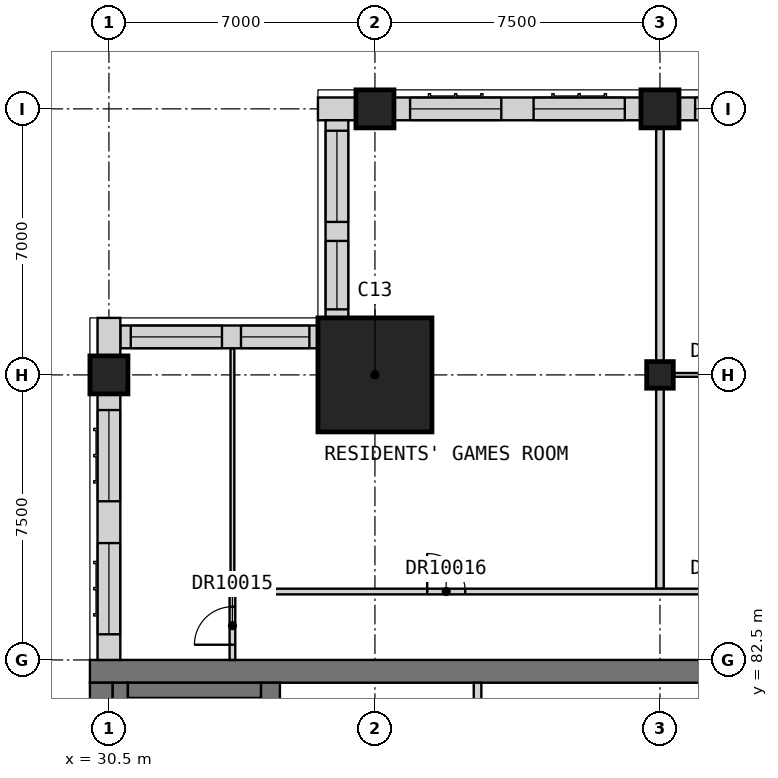
"""IFC4 building model, lengths in metres.
Left out: names, types, materials, properties, quantities, classifications, styles, units other than length and angle.
Written with IfcOpenShell. Run it as: python <this file> out.ifc"""

import sys

from ifc_helpers import new_model, si_unit, direction, frame, frame_2d, origin, origin_2d, place, context, subcontext, project, spatial, rectangle, extrude, element, fill, save


model = new_model("IFC4")
c1 = context("Model", 3, precision=1e-05, world=origin(), true_north=direction((0.0, 1.0)))
c2 = subcontext(c1, "Body", "Model", "MODEL_VIEW")
j1 = project(units=[si_unit("LENGTHUNIT", "METRE"), si_unit("PLANEANGLEUNIT", "RADIAN")], contexts=[c1])
p1 = place(None, origin())
s1 = spatial("IfcSite", under=j1, at=p1, CompositionType="ELEMENT")
p2 = place(p1, origin())
s2 = spatial("IfcBuilding", under=s1, at=p2, CompositionType="ELEMENT")
p3 = place(p2, frame((0.0, 0.0, 283.7)))
s3 = spatial("IfcBuildingStorey", under=s2, at=p3, CompositionType="ELEMENT", Elevation=283.7)
for number, where, z_axis, x_axis in (
    (1, (30.5, 90.0, 0.0), (0.0, 0.0, 1.0), (1.0, 0.0, 0.0)),
    (2, (37.5, 97.0, 0.0), (0.0, 0.0, 1.0), (1.0, 0.0, 0.0)),
):
    element("IfcColumn", number, at=place(p3, frame(where, z_axis=z_axis, x_axis=x_axis)), inside=s3, PredefinedType="COLUMN", context=c2, shape_type="SweptSolid", body=[
        extrude(rectangle(XDim=1.0, YDim=1.0, at=origin_2d()), origin(), (0.0, 0.0, 1.0), 3.5),
    ])
p4 = place(p3, frame((45.0, 90.0, 0.0), z_axis=(0.0, 0.0, 1.0), x_axis=(1.0, 0.0, 0.0)))
e3 = element("IfcColumn", 3, at=p4, inside=s3, PredefinedType="COLUMN", context=c2, shape_type="SweptSolid", body=[
    extrude(rectangle(XDim=0.7, YDim=0.7, at=origin_2d()), origin(), (0.0, 0.0, 1.0), 3.5),
])
p5 = place(p3, frame((45.0, 97.0, 0.0), z_axis=(0.0, 0.0, 1.0), x_axis=(1.0, 0.0, 0.0)))
e4 = element("IfcColumn", 4, at=p5, inside=s3, PredefinedType="COLUMN", context=c2, shape_type="SweptSolid", body=[
    extrude(rectangle(XDim=1.0, YDim=1.0, at=origin_2d()), origin(), (0.0, 0.0, 1.0), 3.5),
])
p6 = place(p3, frame((37.5, 90.0, 0.0), z_axis=(0.0, 0.0, 1.0), x_axis=(1.0, 0.0, 0.0)))
e5 = element("IfcColumn", 5, at=p6, inside=s3, PredefinedType="COLUMN", context=c2, shape_type="SweptSolid", body=[
    extrude(rectangle(XDim=3.0, YDim=3.0, at=origin_2d()), origin(), (0.0, 0.0, 1.0), 3.5),
])
p7 = place(p3, frame((30.0, 82.2, 0.0), z_axis=(0.0, 0.0, 1.0), x_axis=(1.0, 0.0, 0.0)))
e6 = element("IfcWall", 6, at=p7, inside=s3, PredefinedType="SHEAR", context=c2, shape_type="SweptSolid", body=[
    extrude(rectangle(XDim=30.0, YDim=0.6, at=frame_2d((15.0, 0.0))), origin(), (0.0, 0.0, 1.0), 3.5),
])
p8 = place(p3, frame((30.3, 60.6, 0.0), z_axis=(0.0, 0.0, 1.0), x_axis=(0.0, 1.0, 0.0)))
e7 = element("IfcWall", 7, at=p8, inside=s3, PredefinedType="SHEAR", context=c2, shape_type="SweptSolid", body=[
    extrude(rectangle(XDim=21.3, YDim=0.6, at=frame_2d((10.65, 0.0))), origin(), (0.0, 0.0, 1.0), 3.5),
])
p9 = place(p3, frame((34.75, 78.3, 0.0), z_axis=(0.0, 0.0, 1.0), x_axis=(0.0, 1.0, 0.0)))
e8 = element("IfcWall", 8, at=p9, inside=s3, PredefinedType="SHEAR", context=c2, shape_type="SweptSolid", body=[
    extrude(rectangle(XDim=3.6, YDim=0.5, at=frame_2d((1.8, 0.0))), origin(), (0.0, 0.0, 1.0), 3.5),
])
p10 = place(p3, frame((52.0, 97.0, 0.0), z_axis=(0.0, 0.0, 1.0), x_axis=(-1.0, 0.0, 0.0)))
e9 = element("IfcWall", 9, at=p10, inside=s3, PredefinedType="SOLIDWALL", context=c2, shape_type="SweptSolid", body=[
    extrude(rectangle(XDim=6.5, YDim=0.6, at=frame_2d((3.25, 0.0))), origin(), (0.0, 0.0, 1.0), 2.75),
])
p11 = place(p10, frame((3.675, 0.0, 0.8)))
e10 = element("IfcOpeningElement", 10, at=p11, cuts=e9, PredefinedType="OPENING", context=c2, shape_type="SweptSolid", body=[
    extrude(rectangle(XDim=2.4, YDim=1.8, at=frame_2d((1.2, 0.9))), frame((0.0, 0.31, 0.0), z_axis=(0.0, -1.0, 0.0), x_axis=(1.0, 0.0, 0.0)), (0.0, 0.0, 1.0), 0.62),
])
p12 = place(p10, frame((0.425, 0.0, 0.8)))
e11 = element("IfcOpeningElement", 11, at=p12, cuts=e9, PredefinedType="OPENING", context=c2, shape_type="SweptSolid", body=[
    extrude(rectangle(XDim=2.4, YDim=1.8, at=frame_2d((1.2, 0.9))), frame((0.0, 0.31, 0.0), z_axis=(0.0, -1.0, 0.0), x_axis=(1.0, 0.0, 0.0)), (0.0, 0.0, 1.0), 0.62),
])
p13 = place(p3, frame((44.5, 97.0, 0.0), z_axis=(0.0, 0.0, 1.0), x_axis=(-1.0, 0.0, 0.0)))
e12 = element("IfcWall", 12, at=p13, inside=s3, PredefinedType="SOLIDWALL", context=c2, shape_type="SweptSolid", body=[
    extrude(rectangle(XDim=6.5, YDim=0.6, at=frame_2d((3.25, 0.0))), origin(), (0.0, 0.0, 1.0), 2.75),
])
p14 = place(p13, frame((3.675, 0.0, 0.8)))
e13 = element("IfcOpeningElement", 13, at=p14, cuts=e12, PredefinedType="OPENING", context=c2, shape_type="SweptSolid", body=[
    extrude(rectangle(XDim=2.4, YDim=1.8, at=frame_2d((1.2, 0.9))), frame((0.0, 0.31, 0.0), z_axis=(0.0, -1.0, 0.0), x_axis=(1.0, 0.0, 0.0)), (0.0, 0.0, 1.0), 0.62),
])
p15 = place(p13, frame((0.425, 0.0, 0.8)))
e14 = element("IfcOpeningElement", 14, at=p15, cuts=e12, PredefinedType="OPENING", context=c2, shape_type="SweptSolid", body=[
    extrude(rectangle(XDim=2.4, YDim=1.8, at=frame_2d((1.2, 0.9))), frame((0.0, 0.31, 0.0), z_axis=(0.0, -1.0, 0.0), x_axis=(1.0, 0.0, 0.0)), (0.0, 0.0, 1.0), 0.62),
])
p16 = place(p3, frame((37.0, 97.0, 0.0), z_axis=(0.0, 0.0, 1.0), x_axis=(-1.0, 0.0, 0.0)))
e15 = element("IfcWall", 15, at=p16, inside=s3, PredefinedType="SOLIDWALL", context=c2, shape_type="SweptSolid", body=[
    extrude(rectangle(XDim=1.0, YDim=0.6, at=frame_2d((0.5, 0.0))), origin(), (0.0, 0.0, 1.0), 3.2),
])
p17 = place(p3, frame((36.5, 96.7, 0.0), z_axis=(0.0, 0.0, 1.0), x_axis=(0.0, -1.0, 0.0)))
e16 = element("IfcWall", 16, at=p17, inside=s3, PredefinedType="SOLIDWALL", context=c2, shape_type="SweptSolid", body=[
    extrude(rectangle(XDim=5.2, YDim=0.6, at=frame_2d((2.6, 0.0))), origin(), (0.0, 0.0, 1.0), 3.2),
])
p18 = place(p17, frame((3.175, 0.0, 0.8)))
e17 = element("IfcOpeningElement", 17, at=p18, cuts=e16, PredefinedType="OPENING", context=c2, shape_type="SweptSolid", body=[
    extrude(rectangle(XDim=1.8, YDim=1.8, at=frame_2d((0.9, 0.9))), frame((0.0, 0.31, 0.0), z_axis=(0.0, -1.0, 0.0), x_axis=(1.0, 0.0, 0.0)), (0.0, 0.0, 1.0), 0.62),
])
p19 = place(p17, frame((0.275, 0.0, 0.8)))
e18 = element("IfcOpeningElement", 18, at=p19, cuts=e16, PredefinedType="OPENING", context=c2, shape_type="SweptSolid", body=[
    extrude(rectangle(XDim=2.4, YDim=1.8, at=frame_2d((1.2, 0.9))), frame((0.0, 0.31, 0.0), z_axis=(0.0, -1.0, 0.0), x_axis=(1.0, 0.0, 0.0)), (0.0, 0.0, 1.0), 0.62),
])
p20 = place(p3, frame((36.0, 91.0, 0.0), z_axis=(0.0, 0.0, 1.0), x_axis=(-1.0, 0.0, 0.0)))
e19 = element("IfcWall", 19, at=p20, inside=s3, PredefinedType="SOLIDWALL", context=c2, shape_type="SweptSolid", body=[
    extrude(rectangle(XDim=5.2, YDim=0.6, at=frame_2d((2.6, 0.0))), origin(), (0.0, 0.0, 1.0), 3.2),
])
p21 = place(p20, frame((2.525, 0.0, 0.8)))
e20 = element("IfcOpeningElement", 20, at=p21, cuts=e19, PredefinedType="OPENING", context=c2, shape_type="SweptSolid", body=[
    extrude(rectangle(XDim=2.4, YDim=1.8, at=frame_2d((1.2, 0.9))), frame((0.0, 0.31, 0.0), z_axis=(0.0, -1.0, 0.0), x_axis=(1.0, 0.0, 0.0)), (0.0, 0.0, 1.0), 0.62),
])
p22 = place(p20, frame((0.225, 0.0, 0.8)))
e21 = element("IfcOpeningElement", 21, at=p22, cuts=e19, PredefinedType="OPENING", context=c2, shape_type="SweptSolid", body=[
    extrude(rectangle(XDim=1.8, YDim=1.8, at=frame_2d((0.9, 0.9))), frame((0.0, 0.31, 0.0), z_axis=(0.0, -1.0, 0.0), x_axis=(1.0, 0.0, 0.0)), (0.0, 0.0, 1.0), 0.62),
])
p23 = place(p3, frame((30.5, 91.5, 0.0), z_axis=(0.0, 0.0, 1.0), x_axis=(0.0, -1.0, 0.0)))
e22 = element("IfcWall", 22, at=p23, inside=s3, PredefinedType="SOLIDWALL", context=c2, shape_type="SweptSolid", body=[
    extrude(rectangle(XDim=1.0, YDim=0.6, at=frame_2d((0.5, 0.0))), origin(), (0.0, 0.0, 1.0), 3.2),
])
p24 = place(p3, frame((30.5, 89.5, 0.0), z_axis=(0.0, 0.0, 1.0), x_axis=(0.0, -1.0, 0.0)))
e23 = element("IfcWall", 23, at=p24, inside=s3, PredefinedType="SOLIDWALL", context=c2, shape_type="SweptSolid", body=[
    extrude(rectangle(XDim=7.0, YDim=0.6, at=frame_2d((3.5, 0.0))), origin(), (0.0, 0.0, 1.0), 3.2),
])
p25 = place(p24, frame((3.925, 0.0, 0.8)))
e24 = element("IfcOpeningElement", 24, at=p25, cuts=e23, PredefinedType="OPENING", context=c2, shape_type="SweptSolid", body=[
    extrude(rectangle(XDim=2.4, YDim=1.8, at=frame_2d((1.2, 0.9))), frame((0.0, 0.31, 0.0), z_axis=(0.0, -1.0, 0.0), x_axis=(1.0, 0.0, 0.0)), (0.0, 0.0, 1.0), 0.62),
])
p26 = place(p24, frame((0.425, 0.0, 0.8)))
e25 = element("IfcOpeningElement", 25, at=p26, cuts=e23, PredefinedType="OPENING", context=c2, shape_type="SweptSolid", body=[
    extrude(rectangle(XDim=2.4, YDim=1.8, at=frame_2d((1.2, 0.9))), frame((0.0, 0.31, 0.0), z_axis=(0.0, -1.0, 0.0), x_axis=(1.0, 0.0, 0.0)), (0.0, 0.0, 1.0), 0.62),
])
p27 = place(p3, frame((40.2, 78.5, 0.0), z_axis=(0.0, 0.0, 1.0), x_axis=(0.0, 1.0, 0.0)))
e26 = element("IfcWall", 26, at=p27, inside=s3, PredefinedType="SOLIDWALL", context=c2, shape_type="SweptSolid", body=[
    extrude(rectangle(XDim=3.4, YDim=0.2, at=frame_2d((1.7, 0.0))), origin(), (0.0, 0.0, 1.0), 3.5),
])
p28 = place(p3, frame((30.8, 60.6, 0.0), z_axis=(0.0, 0.0, 1.0), x_axis=(0.0, 1.0, 0.0)))
e27 = element("IfcWall", 27, at=p28, inside=s3, PredefinedType="SOLIDWALL", context=c2, shape_type="SweptSolid", body=[
    extrude(rectangle(XDim=21.3, YDim=0.4, at=frame_2d((10.65, 0.0))), origin(), (0.0, 0.0, 1.0), 3.2),
])
p29 = place(p3, frame((31.0, 81.7, 0.0), z_axis=(0.0, 0.0, 1.0), x_axis=(1.0, 0.0, 0.0)))
e28 = element("IfcWall", 28, at=p29, inside=s3, PredefinedType="SOLIDWALL", context=c2, shape_type="SweptSolid", body=[
    extrude(rectangle(XDim=3.5, YDim=0.4, at=frame_2d((1.75, 0.0))), origin(), (0.0, 0.0, 1.0), 3.2),
])
p30 = place(p3, frame((45.0, 84.375, 0.0), z_axis=(0.0, 0.0, 1.0), x_axis=(0.0, 1.0, 0.0)))
e29 = element("IfcWall", 29, at=p30, inside=s3, PredefinedType="PARTITIONING", context=c2, shape_type="SweptSolid", body=[
    extrude(rectangle(XDim=13.125, YDim=0.2, at=frame_2d((6.562, 0.0))), origin(), (0.0, 0.0, 1.0), 3.2),
])
p31 = place(p3, frame((33.75, 84.3, 0.0), z_axis=(0.0, 0.0, 1.0), x_axis=(1.0, 0.0, 0.0)))
e30 = element("IfcWall", 30, at=p31, inside=s3, PredefinedType="PARTITIONING", context=c2, shape_type="SweptSolid", body=[
    extrude(rectangle(XDim=28.05, YDim=0.15, at=frame_2d((14.025, 0.0))), origin(), (0.0, 0.0, 1.0), 3.2),
])
p32 = place(p31, frame((5.125, 0.0, 0.0)))
e31 = element("IfcOpeningElement", 31, at=p32, cuts=e30, PredefinedType="OPENING", context=c2, shape_type="SweptSolid", body=[
    extrude(rectangle(XDim=1.0, YDim=2.1, at=frame_2d((0.5, 1.05))), frame((0.0, 0.085, 0.0), z_axis=(0.0, -1.0, 0.0), x_axis=(1.0, 0.0, 0.0)), (0.0, 0.0, 1.0), 0.17),
])
p33 = place(p31, frame((12.675, 0.0, 0.0)))
e32 = element("IfcOpeningElement", 32, at=p33, cuts=e30, PredefinedType="OPENING", context=c2, shape_type="SweptSolid", body=[
    extrude(rectangle(XDim=0.9, YDim=2.1, at=frame_2d((0.45, 1.05))), frame((0.0, 0.085, 0.0), z_axis=(0.0, -1.0, 0.0), x_axis=(1.0, 0.0, 0.0)), (0.0, 0.0, 1.0), 0.17),
])
p34 = place(p31, frame((20.175, 0.0, 0.0)))
e33 = element("IfcOpeningElement", 33, at=p34, cuts=e30, PredefinedType="OPENING", context=c2, shape_type="SweptSolid", body=[
    extrude(rectangle(XDim=0.9, YDim=2.1, at=frame_2d((0.45, 1.05))), frame((0.0, 0.085, 0.0), z_axis=(0.0, -1.0, 0.0), x_axis=(1.0, 0.0, 0.0)), (0.0, 0.0, 1.0), 0.17),
])
p35 = place(p31, frame((26.65, 0.0, 0.0)))
e34 = element("IfcOpeningElement", 34, at=p35, cuts=e30, PredefinedType="OPENING", context=c2, shape_type="SweptSolid", body=[
    extrude(rectangle(XDim=1.0, YDim=2.1, at=frame_2d((0.5, 1.05))), frame((0.0, 0.085, 0.0), z_axis=(0.0, -1.0, 0.0), x_axis=(1.0, 0.0, 0.0)), (0.0, 0.0, 1.0), 0.17),
])
p36 = place(p3, frame((33.75, 82.5, 0.0), z_axis=(0.0, 0.0, 1.0), x_axis=(0.0, 1.0, 0.0)))
e35 = element("IfcWall", 35, at=p36, inside=s3, PredefinedType="PARTITIONING", context=c2, shape_type="SweptSolid", body=[
    extrude(rectangle(XDim=1.725, YDim=0.15, at=frame_2d((0.863, 0.0))), origin(), (0.0, 0.0, 1.0), 3.2),
])
p37 = place(p36, frame((0.4, 0.0, 0.0)))
e36 = element("IfcOpeningElement", 36, at=p37, cuts=e35, PredefinedType="OPENING", context=c2, shape_type="SweptSolid", body=[
    extrude(rectangle(XDim=1.0, YDim=2.1, at=frame_2d((0.5, 1.05))), frame((0.0, 0.085, 0.0), z_axis=(0.0, -1.0, 0.0), x_axis=(1.0, 0.0, 0.0)), (0.0, 0.0, 1.0), 0.17),
])
p38 = place(p3, frame((45.1, 90.0, 0.0), z_axis=(0.0, 0.0, 1.0), x_axis=(1.0, 0.0, 0.0)))
e37 = element("IfcWall", 37, at=p38, inside=s3, PredefinedType="PARTITIONING", context=c2, shape_type="SweptSolid", body=[
    extrude(rectangle(XDim=14.8, YDim=0.1, at=frame_2d((7.4, 0.0))), origin(), (0.0, 0.0, 1.0), 3.2),
])
p39 = place(p38, frame((1.325, 0.0, 0.0)))
e38 = element("IfcOpeningElement", 38, at=p39, cuts=e37, PredefinedType="OPENING", context=c2, shape_type="SweptSolid", body=[
    extrude(rectangle(XDim=0.9, YDim=2.1, at=frame_2d((0.45, 1.05))), frame((0.0, 0.06, 0.0), z_axis=(0.0, -1.0, 0.0), x_axis=(1.0, 0.0, 0.0)), (0.0, 0.0, 1.0), 0.12),
])
p40 = place(p38, frame((8.825, 0.0, 0.0)))
e39 = element("IfcOpeningElement", 39, at=p40, cuts=e37, PredefinedType="OPENING", context=c2, shape_type="SweptSolid", body=[
    extrude(rectangle(XDim=0.9, YDim=2.1, at=frame_2d((0.45, 1.05))), frame((0.0, 0.06, 0.0), z_axis=(0.0, -1.0, 0.0), x_axis=(1.0, 0.0, 0.0)), (0.0, 0.0, 1.0), 0.12),
])
p41 = place(p3, frame((33.75, 84.375, 0.0), z_axis=(0.0, 0.0, 1.0), x_axis=(0.0, 1.0, 0.0)))
e40 = element("IfcWall", 40, at=p41, inside=s3, PredefinedType="PARTITIONING", context=c2, shape_type="SweptSolid", body=[
    extrude(rectangle(XDim=6.315, YDim=0.1, at=frame_2d((3.157, 0.0))), origin(), (0.0, 0.0, 1.0), 3.2),
])
p42 = place(p11, origin())
e41 = element("IfcWindow", 41, at=p42, inside=s3, PartitioningType="SINGLE_PANEL", PredefinedType="WINDOW", context=c2, shape_type="SweptSolid", body=[
    extrude(rectangle(XDim=2.4, YDim=1.8, at=frame_2d((1.2, 0.9))), frame((0.0, -0.07, 0.0), z_axis=(0.0, -1.0, 0.0), x_axis=(1.0, 0.0, 0.0)), (0.0, 0.0, 1.0), 0.06),
])
fill(e10, e41)
p43 = place(p14, origin())
e42 = element("IfcWindow", 42, at=p43, inside=s3, PartitioningType="SINGLE_PANEL", PredefinedType="WINDOW", context=c2, shape_type="SweptSolid", body=[
    extrude(rectangle(XDim=2.4, YDim=1.8, at=frame_2d((1.2, 0.9))), frame((0.0, -0.07, 0.0), z_axis=(0.0, -1.0, 0.0), x_axis=(1.0, 0.0, 0.0)), (0.0, 0.0, 1.0), 0.06),
])
fill(e13, e42)
p44 = place(p15, origin())
e43 = element("IfcWindow", 43, at=p44, inside=s3, PartitioningType="SINGLE_PANEL", PredefinedType="WINDOW", context=c2, shape_type="SweptSolid", body=[
    extrude(rectangle(XDim=2.4, YDim=1.8, at=frame_2d((1.2, 0.9))), frame((0.0, -0.07, 0.0), z_axis=(0.0, -1.0, 0.0), x_axis=(1.0, 0.0, 0.0)), (0.0, 0.0, 1.0), 0.06),
])
fill(e14, e43)
p45 = place(p18, origin())
e44 = element("IfcWindow", 44, at=p45, inside=s3, PartitioningType="SINGLE_PANEL", PredefinedType="WINDOW", context=c2, shape_type="SweptSolid", body=[
    extrude(rectangle(XDim=1.8, YDim=1.8, at=frame_2d((0.9, 0.9))), frame((0.0, -0.07, 0.0), z_axis=(0.0, -1.0, 0.0), x_axis=(1.0, 0.0, 0.0)), (0.0, 0.0, 1.0), 0.06),
])
fill(e17, e44)
p46 = place(p19, origin())
e45 = element("IfcWindow", 45, at=p46, inside=s3, PartitioningType="SINGLE_PANEL", PredefinedType="WINDOW", context=c2, shape_type="SweptSolid", body=[
    extrude(rectangle(XDim=2.4, YDim=1.8, at=frame_2d((1.2, 0.9))), frame((0.0, -0.07, 0.0), z_axis=(0.0, -1.0, 0.0), x_axis=(1.0, 0.0, 0.0)), (0.0, 0.0, 1.0), 0.06),
])
fill(e18, e45)
p47 = place(p21, origin())
e46 = element("IfcWindow", 46, at=p47, inside=s3, PartitioningType="SINGLE_PANEL", PredefinedType="WINDOW", context=c2, shape_type="SweptSolid", body=[
    extrude(rectangle(XDim=2.4, YDim=1.8, at=frame_2d((1.2, 0.9))), frame((0.0, -0.07, 0.0), z_axis=(0.0, -1.0, 0.0), x_axis=(1.0, 0.0, 0.0)), (0.0, 0.0, 1.0), 0.06),
])
fill(e20, e46)
p48 = place(p22, origin())
e47 = element("IfcWindow", 47, at=p48, inside=s3, PartitioningType="SINGLE_PANEL", PredefinedType="WINDOW", context=c2, shape_type="SweptSolid", body=[
    extrude(rectangle(XDim=1.8, YDim=1.8, at=frame_2d((0.9, 0.9))), frame((0.0, -0.07, 0.0), z_axis=(0.0, -1.0, 0.0), x_axis=(1.0, 0.0, 0.0)), (0.0, 0.0, 1.0), 0.06),
])
fill(e21, e47)
p49 = place(p25, origin())
e48 = element("IfcWindow", 48, at=p49, inside=s3, PartitioningType="SINGLE_PANEL", PredefinedType="WINDOW", context=c2, shape_type="SweptSolid", body=[
    extrude(rectangle(XDim=2.4, YDim=1.8, at=frame_2d((1.2, 0.9))), frame((0.0, -0.07, 0.0), z_axis=(0.0, -1.0, 0.0), x_axis=(1.0, 0.0, 0.0)), (0.0, 0.0, 1.0), 0.06),
])
fill(e24, e48)
p50 = place(p26, origin())
e49 = element("IfcWindow", 49, at=p50, inside=s3, PartitioningType="SINGLE_PANEL", PredefinedType="WINDOW", context=c2, shape_type="SweptSolid", body=[
    extrude(rectangle(XDim=2.4, YDim=1.8, at=frame_2d((1.2, 0.9))), frame((0.0, -0.07, 0.0), z_axis=(0.0, -1.0, 0.0), x_axis=(1.0, 0.0, 0.0)), (0.0, 0.0, 1.0), 0.06),
])
fill(e25, e49)
p51 = place(p37, origin())
e50 = element("IfcDoor", 50, at=p51, inside=s3, OperationType="SINGLE_SWING_LEFT", PredefinedType="DOOR", context=c2, shape_type="SweptSolid", body=[
    extrude(rectangle(XDim=1.0, YDim=2.1, at=frame_2d((0.5, 1.05))), frame((0.0, 0.025, 0.0), z_axis=(0.0, -1.0, 0.0), x_axis=(1.0, 0.0, 0.0)), (0.0, 0.0, 1.0), 0.05),
])
fill(e36, e50)
p52 = place(p32, origin())
e51 = element("IfcDoor", 51, at=p52, inside=s3, OperationType="SINGLE_SWING_LEFT", PredefinedType="DOOR", context=c2, shape_type="SweptSolid", body=[
    extrude(rectangle(XDim=1.0, YDim=2.1, at=frame_2d((0.5, 1.05))), frame((0.0, 0.025, 0.0), z_axis=(0.0, -1.0, 0.0), x_axis=(1.0, 0.0, 0.0)), (0.0, 0.0, 1.0), 0.05),
])
fill(e31, e51)
save(model, sys.argv[1])
